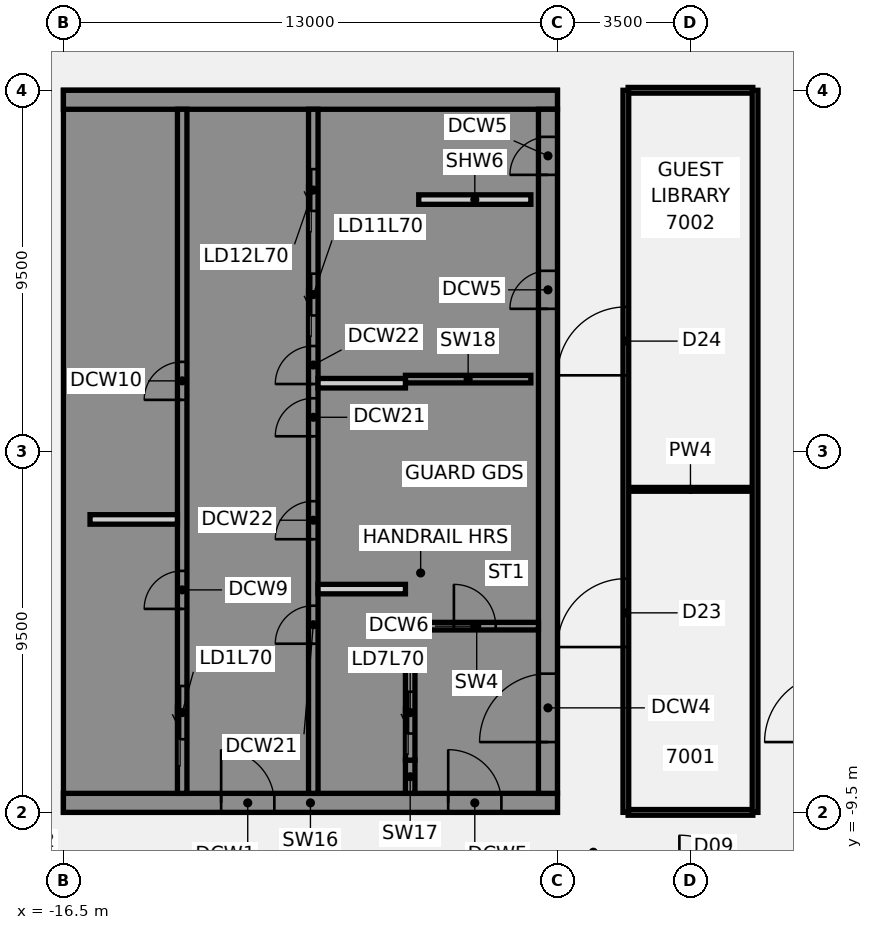
"""IFC4 building model, lengths in metres.
Left out: names, types, materials, properties, quantities, classifications, styles, units other than length and angle.
Written with IfcOpenShell. Run it as: python <this file> out.ifc"""

import sys

from ifc_helpers import new_model, si_unit, direction, frame, frame_2d, origin, place, context, subcontext, project, spatial, polyline, rectangle, outline, extrude, element, fill, save


model = new_model("IFC4")
c1 = context("Model", 3, precision=1e-05, world=origin(), true_north=direction((0.0, 1.0)))
c2 = subcontext(c1, "Body", "Model", "MODEL_VIEW")
j1 = project(units=[si_unit("LENGTHUNIT", "METRE"), si_unit("PLANEANGLEUNIT", "RADIAN")], contexts=[c1])
p1 = place(None, origin())
s1 = spatial("IfcSite", under=j1, at=p1, CompositionType="ELEMENT")
p2 = place(p1, origin())
s2 = spatial("IfcBuilding", under=s1, at=p2, CompositionType="ELEMENT")
p3 = place(p2, frame((0.0, 0.0, 274.8)))
s3 = spatial("IfcBuildingStorey", under=s2, at=p3, CompositionType="ELEMENT", Elevation=274.8)
p4 = place(p3, frame((-1.64, -9.5, 0.0), z_axis=(0.0, 0.0, 1.0), x_axis=(1.0, 0.0, 0.0)))
e1 = element("IfcWall", 1, at=p4, inside=s3, PredefinedType="PARTITIONING", context=c2, shape_type="SweptSolid", body=[
    extrude(rectangle(XDim=3.28, YDim=0.15, at=frame_2d((1.64, 0.0))), origin(), (0.0, 0.0, 1.0), 2.824),
])
p5 = place(p3, frame((-1.64, -1.0, 0.0), z_axis=(0.0, 0.0, 1.0), x_axis=(1.0, 0.0, 0.0)))
e2 = element("IfcWall", 2, at=p5, inside=s3, PredefinedType="PARTITIONING", context=c2, shape_type="SweptSolid", body=[
    extrude(rectangle(XDim=3.28, YDim=0.1, at=frame_2d((1.64, 0.0))), origin(), (0.0, 0.0, 1.0), 2.824),
])
p6 = place(p3, frame((-1.64, 9.5, 0.0), z_axis=(0.0, 0.0, 1.0), x_axis=(1.0, 0.0, 0.0)))
e3 = element("IfcWall", 3, at=p6, inside=s3, PredefinedType="PARTITIONING", context=c2, shape_type="SweptSolid", body=[
    extrude(rectangle(XDim=3.28, YDim=0.15, at=frame_2d((1.64, 0.0))), origin(), (0.0, 0.0, 1.0), 2.824),
])
p7 = place(p3, frame((-1.7, -9.5, 0.0), z_axis=(0.0, 0.0, 1.0), x_axis=(0.0, 1.0, 0.0)))
e4 = element("IfcWall", 4, at=p7, inside=s3, PredefinedType="PARTITIONING", context=c2, shape_type="SweptSolid", body=[
    extrude(rectangle(XDim=19.0, YDim=0.15, at=frame_2d((9.5, 0.0))), origin(), (0.0, 0.0, 1.0), 2.824),
])
p8 = place(p7, frame((4.35, 0.0, 0.0)))
e5 = element("IfcOpeningElement", 5, at=p8, cuts=e4, PredefinedType="OPENING", context=c2, shape_type="SweptSolid", body=[
    extrude(rectangle(XDim=1.8, YDim=2.1, at=frame_2d((0.9, 1.05))), frame((0.0, 0.085, 0.0), z_axis=(0.0, -1.0, 0.0), x_axis=(1.0, 0.0, 0.0)), (0.0, 0.0, 1.0), 0.17),
])
p9 = place(p7, frame((11.5, 0.0, 0.0)))
e6 = element("IfcOpeningElement", 6, at=p9, cuts=e4, PredefinedType="OPENING", context=c2, shape_type="SweptSolid", body=[
    extrude(rectangle(XDim=1.8, YDim=2.1, at=frame_2d((0.9, 1.05))), frame((0.0, 0.085, 0.0), z_axis=(0.0, -1.0, 0.0), x_axis=(1.0, 0.0, 0.0)), (0.0, 0.0, 1.0), 0.17),
])
p10 = place(p3, frame((1.7, -9.5, 0.0), z_axis=(0.0, 0.0, 1.0), x_axis=(0.0, 1.0, 0.0)))
e7 = element("IfcWall", 7, at=p10, inside=s3, PredefinedType="PARTITIONING", context=c2, shape_type="SweptSolid", body=[
    extrude(rectangle(XDim=19.0, YDim=0.15, at=frame_2d((9.5, 0.0))), origin(), (0.0, 0.0, 1.0), 2.824),
])
p11 = place(p3, frame((-16.5, -9.25, 0.0), z_axis=(0.0, 0.0, 1.0), x_axis=(1.0, 0.0, 0.0)))
e8 = element("IfcWall", 8, at=p11, inside=s3, PredefinedType="SHEAR", context=c2, shape_type="SweptSolid", body=[
    extrude(rectangle(XDim=13.0, YDim=0.5, at=frame_2d((6.5, 0.0))), origin(), (0.0, 0.0, 1.0), 3.42),
])
p12 = place(p11, frame((4.15, 0.0, 0.0)))
e9 = element("IfcOpeningElement", 9, at=p12, cuts=e8, PredefinedType="OPENING", context=c2, shape_type="SweptSolid", body=[
    extrude(rectangle(XDim=1.4, YDim=2.1, at=frame_2d((0.7, 1.05))), frame((0.0, 0.26, 0.0), z_axis=(0.0, -1.0, 0.0), x_axis=(1.0, 0.0, 0.0)), (0.0, 0.0, 1.0), 0.52),
])
p13 = place(p11, frame((10.125, 0.0, 0.0)))
e10 = element("IfcOpeningElement", 10, at=p13, cuts=e8, PredefinedType="OPENING", context=c2, shape_type="SweptSolid", body=[
    extrude(rectangle(XDim=1.4, YDim=2.1, at=frame_2d((0.7, 1.05))), frame((0.0, 0.26, 0.0), z_axis=(0.0, -1.0, 0.0), x_axis=(1.0, 0.0, 0.0)), (0.0, 0.0, 1.0), 0.52),
])
p14 = place(p3, origin())
e11 = element("IfcWall", 11, at=p14, inside=s3, PredefinedType="SHEAR", context=c2, shape_type="SweptSolid", body=[
    extrude(outline(polyline([(-13.5, -8.125), (-16.0, -8.125), (-16.0, -5.625), (-13.5, -5.625), (-13.5, -5.375), (-16.0, -5.375), (-16.0, 5.375), (-13.5, 5.375), (-13.5, 5.625), (-16.0, 5.625), (-16.0, 8.125), (-13.5, 8.125), (-13.5, 9.0), (-16.0, 9.0), (-16.5, 9.0), (-16.5, -9.0), (-16.0, -9.0), (-13.5, -9.0), (-13.5, -8.125)])), origin(), (0.0, 0.0, 1.0), 3.42),
])
p15 = place(p3, frame((-16.5, 9.25, 0.0), z_axis=(0.0, 0.0, 1.0), x_axis=(1.0, 0.0, 0.0)))
e12 = element("IfcWall", 12, at=p15, inside=s3, PredefinedType="SHEAR", context=c2, shape_type="SweptSolid", body=[
    extrude(rectangle(XDim=13.0, YDim=0.5, at=frame_2d((6.5, 0.0))), origin(), (0.0, 0.0, 1.0), 3.42),
])
p16 = place(p3, origin())
e13 = element("IfcWall", 13, at=p16, inside=s3, PredefinedType="SHEAR", context=c2, shape_type="SweptSolid", body=[
    extrude(outline(polyline([(-9.8, -5.375), (-9.8, -5.625), (-7.5, -5.625), (-7.25, -5.625), (-7.25, 9.0), (-7.5, 9.0), (-9.8, 9.0), (-9.8, 8.125), (-7.5, 8.125), (-7.5, 5.625), (-9.8, 5.625), (-9.8, 5.375), (-7.5, 5.375), (-7.5, 2.875), (-9.8, 2.875), (-9.8, 2.625), (-7.5, 2.625), (-7.5, -5.375), (-9.8, -5.375)])), origin(), (0.0, 0.0, 1.0), 3.42),
])
p17 = place(p3, origin())
e14 = element("IfcWall", 14, at=p17, inside=s3, PredefinedType="SHEAR", context=c2, shape_type="SweptSolid", body=[
    extrude(outline(polyline([(-7.5, -8.125), (-9.55, -8.125), (-9.55, -5.625), (-9.8, -5.625), (-9.8, -8.125), (-9.8, -9.0), (-7.5, -9.0), (-7.5, -8.125)])), origin(), (0.0, 0.0, 1.0), 3.42),
])
p18 = place(p3, frame((-7.375, -9.0, 0.0), z_axis=(0.0, 0.0, 1.0), x_axis=(0.0, 1.0, 0.0)))
e15 = element("IfcWall", 15, at=p18, inside=s3, PredefinedType="SHEAR", context=c2, shape_type="SweptSolid", body=[
    extrude(rectangle(XDim=0.875, YDim=0.25, at=frame_2d((0.438, 0.0))), origin(), (0.0, 0.0, 1.0), 3.42),
])
p19 = place(p3, frame((-7.5, 1.9, 0.0), z_axis=(0.0, 0.0, 1.0), x_axis=(1.0, 0.0, 0.0)))
e16 = element("IfcWall", 16, at=p19, inside=s3, PredefinedType="SHEAR", context=c2, shape_type="SweptSolid", body=[
    extrude(rectangle(XDim=3.3, YDim=0.2, at=frame_2d((1.65, 0.0))), origin(), (0.0, 0.0, 1.0), 3.42),
])
p20 = place(p3, frame((-13.375, -9.0, 0.0), z_axis=(0.0, 0.0, 1.0), x_axis=(0.0, 1.0, 0.0)))
e17 = element("IfcWall", 17, at=p20, inside=s3, PredefinedType="SHEAR", context=c2, shape_type="SweptSolid", body=[
    extrude(rectangle(XDim=18.0, YDim=0.25, at=frame_2d((9.0, 0.0))), origin(), (0.0, 0.0, 1.0), 3.42),
])
p21 = place(p20, frame((1.425, 0.0, 0.0)))
e18 = element("IfcOpeningElement", 18, at=p21, cuts=e17, PredefinedType="OPENING", context=c2, shape_type="SweptSolid", body=[
    extrude(rectangle(XDim=1.4, YDim=2.1, at=frame_2d((0.7, 1.05))), frame((0.0, 0.135, 0.0), z_axis=(0.0, -1.0, 0.0), x_axis=(1.0, 0.0, 0.0)), (0.0, 0.0, 1.0), 0.27),
])
p22 = place(p20, frame((4.854, 0.0, 0.0)))
e19 = element("IfcOpeningElement", 19, at=p22, cuts=e17, PredefinedType="OPENING", context=c2, shape_type="SweptSolid", body=[
    extrude(rectangle(XDim=1.0, YDim=2.1, at=frame_2d((0.5, 1.05))), frame((0.0, 0.135, 0.0), z_axis=(0.0, -1.0, 0.0), x_axis=(1.0, 0.0, 0.0)), (0.0, 0.0, 1.0), 0.27),
])
p23 = place(p20, frame((10.354, 0.0, 0.0)))
e20 = element("IfcOpeningElement", 20, at=p23, cuts=e17, PredefinedType="OPENING", context=c2, shape_type="SweptSolid", body=[
    extrude(rectangle(XDim=1.0, YDim=2.1, at=frame_2d((0.5, 1.05))), frame((0.0, 0.135, 0.0), z_axis=(0.0, -1.0, 0.0), x_axis=(1.0, 0.0, 0.0)), (0.0, 0.0, 1.0), 0.27),
])
p24 = place(p3, frame((-9.925, -9.0, 0.0), z_axis=(0.0, 0.0, 1.0), x_axis=(0.0, 1.0, 0.0)))
e21 = element("IfcWall", 21, at=p24, inside=s3, PredefinedType="SHEAR", context=c2, shape_type="SweptSolid", body=[
    extrude(rectangle(XDim=18.0, YDim=0.25, at=frame_2d((9.0, 0.0))), origin(), (0.0, 0.0, 1.0), 3.42),
])
p25 = place(p24, frame((12.575, 0.0, 0.0)))
e22 = element("IfcOpeningElement", 22, at=p25, cuts=e21, PredefinedType="OPENING", context=c2, shape_type="SweptSolid", body=[
    extrude(rectangle(XDim=1.1, YDim=2.1, at=frame_2d((0.55, 1.05))), frame((0.0, 0.135, 0.0), z_axis=(0.0, -1.0, 0.0), x_axis=(1.0, 0.0, 0.0)), (0.0, 0.0, 1.0), 0.27),
])
p26 = place(p24, frame((15.325, 0.0, 0.0)))
e23 = element("IfcOpeningElement", 23, at=p26, cuts=e21, PredefinedType="OPENING", context=c2, shape_type="SweptSolid", body=[
    extrude(rectangle(XDim=1.1, YDim=2.1, at=frame_2d((0.55, 1.05))), frame((0.0, 0.135, 0.0), z_axis=(0.0, -1.0, 0.0), x_axis=(1.0, 0.0, 0.0)), (0.0, 0.0, 1.0), 0.27),
])
p27 = place(p24, frame((3.938, 0.0, 0.0)))
e24 = element("IfcOpeningElement", 24, at=p27, cuts=e21, PredefinedType="OPENING", context=c2, shape_type="SweptSolid", body=[
    extrude(rectangle(XDim=1.0, YDim=2.1, at=frame_2d((0.5, 1.05))), frame((0.0, 0.135, 0.0), z_axis=(0.0, -1.0, 0.0), x_axis=(1.0, 0.0, 0.0)), (0.0, 0.0, 1.0), 0.27),
])
p28 = place(p24, frame((6.688, 0.0, 0.0)))
e25 = element("IfcOpeningElement", 25, at=p28, cuts=e21, PredefinedType="OPENING", context=c2, shape_type="SweptSolid", body=[
    extrude(rectangle(XDim=1.0, YDim=2.1, at=frame_2d((0.5, 1.05))), frame((0.0, 0.135, 0.0), z_axis=(0.0, -1.0, 0.0), x_axis=(1.0, 0.0, 0.0)), (0.0, 0.0, 1.0), 0.27),
])
p29 = place(p24, frame((9.396, 0.0, 0.0)))
e26 = element("IfcOpeningElement", 26, at=p29, cuts=e21, PredefinedType="OPENING", context=c2, shape_type="SweptSolid", body=[
    extrude(rectangle(XDim=1.0, YDim=2.1, at=frame_2d((0.5, 1.05))), frame((0.0, 0.135, 0.0), z_axis=(0.0, -1.0, 0.0), x_axis=(1.0, 0.0, 0.0)), (0.0, 0.0, 1.0), 0.27),
])
p30 = place(p24, frame((10.771, 0.0, 0.0)))
e27 = element("IfcOpeningElement", 27, at=p30, cuts=e21, PredefinedType="OPENING", context=c2, shape_type="SweptSolid", body=[
    extrude(rectangle(XDim=1.0, YDim=2.1, at=frame_2d((0.5, 1.05))), frame((0.0, 0.135, 0.0), z_axis=(0.0, -1.0, 0.0), x_axis=(1.0, 0.0, 0.0)), (0.0, 0.0, 1.0), 0.27),
])
p31 = place(p3, frame((-7.375, -8.125, 0.0), z_axis=(0.0, 0.0, 1.0), x_axis=(0.0, 1.0, 0.0)))
e28 = element("IfcWall", 28, at=p31, inside=s3, PredefinedType="SHEAR", context=c2, shape_type="SweptSolid", body=[
    extrude(rectangle(XDim=2.5, YDim=0.25, at=frame_2d((1.25, 0.0))), origin(), (0.0, 0.0, 1.0), 3.42),
])
p32 = place(p31, frame((0.7, 0.0, 0.0)))
e29 = element("IfcOpeningElement", 29, at=p32, cuts=e28, PredefinedType="OPENING", context=c2, shape_type="SweptSolid", body=[
    extrude(rectangle(XDim=1.1, YDim=2.1, at=frame_2d((0.55, 1.05))), frame((0.0, 0.135, 0.0), z_axis=(0.0, -1.0, 0.0), x_axis=(1.0, 0.0, 0.0)), (0.0, 0.0, 1.0), 0.27),
])
p33 = place(p3, frame((-3.75, -9.0, 0.0), z_axis=(0.0, 0.0, 1.0), x_axis=(0.0, 1.0, 0.0)))
e30 = element("IfcWall", 30, at=p33, inside=s3, PredefinedType="SHEAR", context=c2, shape_type="SweptSolid", body=[
    extrude(rectangle(XDim=18.0, YDim=0.5, at=frame_2d((9.0, 0.0))), origin(), (0.0, 0.0, 1.0), 3.42),
])
p34 = place(p33, frame((1.35, 0.0, 0.0)))
e31 = element("IfcOpeningElement", 31, at=p34, cuts=e30, PredefinedType="OPENING", context=c2, shape_type="SweptSolid", body=[
    extrude(rectangle(XDim=1.8, YDim=2.1, at=frame_2d((0.9, 1.05))), frame((0.0, 0.26, 0.0), z_axis=(0.0, -1.0, 0.0), x_axis=(1.0, 0.0, 0.0)), (0.0, 0.0, 1.0), 0.52),
])
p35 = place(p33, frame((12.75, 0.0, 0.0)))
e32 = element("IfcOpeningElement", 32, at=p35, cuts=e30, PredefinedType="OPENING", context=c2, shape_type="SweptSolid", body=[
    extrude(rectangle(XDim=1.0, YDim=2.1, at=frame_2d((0.5, 1.05))), frame((0.0, 0.26, 0.0), z_axis=(0.0, -1.0, 0.0), x_axis=(1.0, 0.0, 0.0)), (0.0, 0.0, 1.0), 0.52),
])
p36 = place(p33, frame((16.274, 0.0, 0.0)))
e33 = element("IfcOpeningElement", 33, at=p36, cuts=e30, PredefinedType="OPENING", context=c2, shape_type="SweptSolid", body=[
    extrude(rectangle(XDim=1.0, YDim=2.1, at=frame_2d((0.5, 1.05))), frame((0.0, 0.26, 0.0), z_axis=(0.0, -1.0, 0.0), x_axis=(1.0, 0.0, 0.0)), (0.0, 0.0, 1.0), 0.52),
])
p37 = place(p3, frame((-7.15, 6.624, 0.0), z_axis=(0.0, 0.0, 1.0), x_axis=(1.0, 0.0, 0.0)))
e34 = element("IfcWall", 34, at=p37, inside=s3, PredefinedType="PARTITIONING", context=c2, shape_type="SweptSolid", body=[
    extrude(rectangle(XDim=2.95, YDim=0.25, at=frame_2d((1.475, 0.0))), origin(), (0.0, 0.0, 1.0), 3.42),
])
p38 = place(p3, frame((-7.25, -4.6, 0.0), z_axis=(0.0, 0.0, 1.0), x_axis=(1.0, 0.0, 0.0)))
e35 = element("IfcWall", 35, at=p38, inside=s3, PredefinedType="SHEAR", context=c2, shape_type="SweptSolid", body=[
    extrude(rectangle(XDim=3.25, YDim=0.2, at=frame_2d((1.625, 0.0))), origin(), (0.0, 0.0, 1.0), 3.42),
])
p39 = place(p38, frame((1.025, 0.0, 0.0)))
e36 = element("IfcOpeningElement", 36, at=p39, cuts=e35, PredefinedType="OPENING", context=c2, shape_type="SweptSolid", body=[
    extrude(rectangle(XDim=1.1, YDim=2.1, at=frame_2d((0.55, 1.05))), frame((0.0, 0.11, 0.0), z_axis=(0.0, -1.0, 0.0), x_axis=(1.0, 0.0, 0.0)), (0.0, 0.0, 1.0), 0.22),
])
for number, where, z_axis, x_axis in (
    (37, (-15.8, -1.792, 0.0), (0.0, 0.0, 1.0), (1.0, 0.0, 0.0)),
    (38, (-9.8, -3.625, 0.0), (0.0, 0.0, 1.0), (1.0, 0.0, 0.0)),
    (39, (-9.8, 1.792, 0.0), (0.0, 0.0, 1.0), (1.0, 0.0, 0.0)),
):
    element("IfcWall", number, at=place(p3, frame(where, z_axis=z_axis, x_axis=x_axis)), inside=s3, PredefinedType="PARTITIONING", context=c2, shape_type="SweptSolid", body=[
        extrude(rectangle(XDim=2.3, YDim=0.25, at=frame_2d((1.15, 0.0))), origin(), (0.0, 0.0, 1.0), 3.42),
    ])
p40 = place(p8, frame((1.8, 0.0, 0.0), z_axis=(0.0, 0.0, 1.0), x_axis=(-1.0, 0.0, 0.0)))
e40 = element("IfcDoor", 40, at=p40, inside=s3, OperationType="DOUBLE_DOOR_SINGLE_SWING", PredefinedType="DOOR", context=c2, shape_type="SweptSolid", body=[
    extrude(rectangle(XDim=1.8, YDim=2.1, at=frame_2d((0.9, 1.05))), frame((0.0, 0.025, 0.0), z_axis=(0.0, -1.0, 0.0), x_axis=(1.0, 0.0, 0.0)), (0.0, 0.0, 1.0), 0.05),
])
fill(e5, e40)
p41 = place(p9, frame((1.8, 0.0, 0.0), z_axis=(0.0, 0.0, 1.0), x_axis=(-1.0, 0.0, 0.0)))
e41 = element("IfcDoor", 41, at=p41, inside=s3, OperationType="DOUBLE_DOOR_SINGLE_SWING", PredefinedType="DOOR", context=c2, shape_type="SweptSolid", body=[
    extrude(rectangle(XDim=1.8, YDim=2.1, at=frame_2d((0.9, 1.05))), frame((0.0, 0.025, 0.0), z_axis=(0.0, -1.0, 0.0), x_axis=(1.0, 0.0, 0.0)), (0.0, 0.0, 1.0), 0.05),
])
fill(e6, e41)
p42 = place(p12, origin())
e42 = element("IfcDoor", 42, at=p42, inside=s3, OperationType="SINGLE_SWING_LEFT", PredefinedType="DOOR", context=c2, shape_type="SweptSolid", body=[
    extrude(rectangle(XDim=1.4, YDim=2.1, at=frame_2d((0.7, 1.05))), frame((0.0, 0.025, 0.0), z_axis=(0.0, -1.0, 0.0), x_axis=(1.0, 0.0, 0.0)), (0.0, 0.0, 1.0), 0.05),
])
fill(e9, e42)
p43 = place(p13, origin())
e43 = element("IfcDoor", 43, at=p43, inside=s3, OperationType="SINGLE_SWING_LEFT", PredefinedType="DOOR", context=c2, shape_type="SweptSolid", body=[
    extrude(rectangle(XDim=1.4, YDim=2.1, at=frame_2d((0.7, 1.05))), frame((0.0, 0.025, 0.0), z_axis=(0.0, -1.0, 0.0), x_axis=(1.0, 0.0, 0.0)), (0.0, 0.0, 1.0), 0.05),
])
fill(e10, e43)
p44 = place(p34, origin())
e44 = element("IfcDoor", 44, at=p44, inside=s3, OperationType="SINGLE_SWING_LEFT", PredefinedType="DOOR", context=c2, shape_type="SweptSolid", body=[
    extrude(rectangle(XDim=1.8, YDim=2.1, at=frame_2d((0.9, 1.05))), frame((0.0, 0.025, 0.0), z_axis=(0.0, -1.0, 0.0), x_axis=(1.0, 0.0, 0.0)), (0.0, 0.0, 1.0), 0.05),
])
fill(e31, e44)
p45 = place(p35, origin())
e45 = element("IfcDoor", 45, at=p45, inside=s3, OperationType="SINGLE_SWING_LEFT", PredefinedType="DOOR", context=c2, shape_type="SweptSolid", body=[
    extrude(rectangle(XDim=1.0, YDim=2.1, at=frame_2d((0.5, 1.05))), frame((0.0, 0.225, 0.0), z_axis=(0.0, -1.0, 0.0), x_axis=(1.0, 0.0, 0.0)), (0.0, 0.0, 1.0), 0.05),
])
fill(e32, e45)
p46 = place(p36, origin())
e46 = element("IfcDoor", 46, at=p46, inside=s3, OperationType="SINGLE_SWING_LEFT", PredefinedType="DOOR", context=c2, shape_type="SweptSolid", body=[
    extrude(rectangle(XDim=1.0, YDim=2.1, at=frame_2d((0.5, 1.05))), frame((0.0, 0.225, 0.0), z_axis=(0.0, -1.0, 0.0), x_axis=(1.0, 0.0, 0.0)), (0.0, 0.0, 1.0), 0.05),
])
fill(e33, e46)
p47 = place(p39, origin())
e47 = element("IfcDoor", 47, at=p47, inside=s3, OperationType="SINGLE_SWING_LEFT", PredefinedType="DOOR", context=c2, shape_type="SweptSolid", body=[
    extrude(rectangle(XDim=1.1, YDim=2.1, at=frame_2d((0.55, 1.05))), frame((0.0, 0.025, 0.0), z_axis=(0.0, -1.0, 0.0), x_axis=(1.0, 0.0, 0.0)), (0.0, 0.0, 1.0), 0.05),
])
fill(e36, e47)
p48 = place(p21, origin())
e48 = element("IfcDoor", 48, at=p48, inside=s3, OperationType="SLIDING_TO_LEFT", PredefinedType="DOOR", context=c2, shape_type="SweptSolid", body=[
    extrude(rectangle(XDim=1.4, YDim=2.1, at=frame_2d((0.7, 1.05))), frame((0.0, 0.025, 0.0), z_axis=(0.0, -1.0, 0.0), x_axis=(1.0, 0.0, 0.0)), (0.0, 0.0, 1.0), 0.05),
])
fill(e18, e48)
p49 = place(p32, origin())
e49 = element("IfcDoor", 49, at=p49, inside=s3, OperationType="SLIDING_TO_LEFT", PredefinedType="DOOR", context=c2, shape_type="SweptSolid", body=[
    extrude(rectangle(XDim=1.1, YDim=2.1, at=frame_2d((0.55, 1.05))), frame((0.0, 0.025, 0.0), z_axis=(0.0, -1.0, 0.0), x_axis=(1.0, 0.0, 0.0)), (0.0, 0.0, 1.0), 0.05),
])
fill(e29, e49)
p50 = place(p25, origin())
e50 = element("IfcDoor", 50, at=p50, inside=s3, OperationType="SLIDING_TO_LEFT", PredefinedType="DOOR", context=c2, shape_type="SweptSolid", body=[
    extrude(rectangle(XDim=1.1, YDim=2.1, at=frame_2d((0.55, 1.05))), frame((0.0, 0.025, 0.0), z_axis=(0.0, -1.0, 0.0), x_axis=(1.0, 0.0, 0.0)), (0.0, 0.0, 1.0), 0.05),
])
fill(e22, e50)
p51 = place(p26, origin())
e51 = element("IfcDoor", 51, at=p51, inside=s3, OperationType="SLIDING_TO_LEFT", PredefinedType="DOOR", context=c2, shape_type="SweptSolid", body=[
    extrude(rectangle(XDim=1.1, YDim=2.1, at=frame_2d((0.55, 1.05))), frame((0.0, 0.025, 0.0), z_axis=(0.0, -1.0, 0.0), x_axis=(1.0, 0.0, 0.0)), (0.0, 0.0, 1.0), 0.05),
])
fill(e23, e51)
p52 = place(p22, origin())
e52 = element("IfcDoor", 52, at=p52, inside=s3, OperationType="SINGLE_SWING_LEFT", PredefinedType="DOOR", context=c2, shape_type="SweptSolid", body=[
    extrude(rectangle(XDim=1.0, YDim=2.1, at=frame_2d((0.5, 1.05))), frame((0.0, 0.025, 0.0), z_axis=(0.0, -1.0, 0.0), x_axis=(1.0, 0.0, 0.0)), (0.0, 0.0, 1.0), 0.05),
])
fill(e19, e52)
p53 = place(p23, origin())
e53 = element("IfcDoor", 53, at=p53, inside=s3, OperationType="SINGLE_SWING_LEFT", PredefinedType="DOOR", context=c2, shape_type="SweptSolid", body=[
    extrude(rectangle(XDim=1.0, YDim=2.1, at=frame_2d((0.5, 1.05))), frame((0.0, 0.025, 0.0), z_axis=(0.0, -1.0, 0.0), x_axis=(1.0, 0.0, 0.0)), (0.0, 0.0, 1.0), 0.05),
])
fill(e20, e53)
p54 = place(p27, origin())
e54 = element("IfcDoor", 54, at=p54, inside=s3, OperationType="SINGLE_SWING_LEFT", PredefinedType="DOOR", context=c2, shape_type="SweptSolid", body=[
    extrude(rectangle(XDim=1.0, YDim=2.1, at=frame_2d((0.5, 1.05))), frame((0.0, 0.025, 0.0), z_axis=(0.0, -1.0, 0.0), x_axis=(1.0, 0.0, 0.0)), (0.0, 0.0, 1.0), 0.05),
])
fill(e24, e54)
p55 = place(p28, origin())
e55 = element("IfcDoor", 55, at=p55, inside=s3, OperationType="SINGLE_SWING_LEFT", PredefinedType="DOOR", context=c2, shape_type="SweptSolid", body=[
    extrude(rectangle(XDim=1.0, YDim=2.1, at=frame_2d((0.5, 1.05))), frame((0.0, 0.025, 0.0), z_axis=(0.0, -1.0, 0.0), x_axis=(1.0, 0.0, 0.0)), (0.0, 0.0, 1.0), 0.05),
])
fill(e25, e55)
p56 = place(p29, origin())
e56 = element("IfcDoor", 56, at=p56, inside=s3, OperationType="SINGLE_SWING_LEFT", PredefinedType="DOOR", context=c2, shape_type="SweptSolid", body=[
    extrude(rectangle(XDim=1.0, YDim=2.1, at=frame_2d((0.5, 1.05))), frame((0.0, 0.025, 0.0), z_axis=(0.0, -1.0, 0.0), x_axis=(1.0, 0.0, 0.0)), (0.0, 0.0, 1.0), 0.05),
])
fill(e26, e56)
p57 = place(p30, origin())
e57 = element("IfcDoor", 57, at=p57, inside=s3, OperationType="SINGLE_SWING_LEFT", PredefinedType="DOOR", context=c2, shape_type="SweptSolid", body=[
    extrude(rectangle(XDim=1.0, YDim=2.1, at=frame_2d((0.5, 1.05))), frame((0.0, 0.025, 0.0), z_axis=(0.0, -1.0, 0.0), x_axis=(1.0, 0.0, 0.0)), (0.0, 0.0, 1.0), 0.05),
])
fill(e27, e57)
save(model, sys.argv[1])
